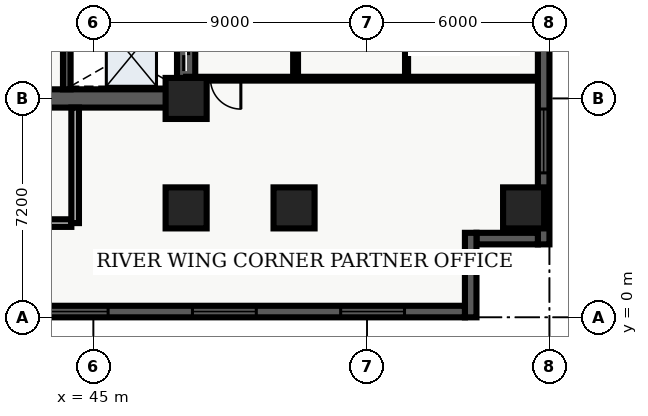
"""IFC4 building model, lengths in metres.
Left out: names, types, materials, properties, quantities, classifications, styles, units other than length and angle.
Written with IfcOpenShell. Run it as: python <this file> out.ifc"""

import sys

from ifc_helpers import new_model, entity, si_unit, converted_unit, direction, frame, origin_with_axes, origin_2d_with_axis, place, context, subcontext, project, spatial, polyline, rectangle, outline, extrude, element, fill, save


model = new_model("IFC4")
c1 = context("Model", 3, precision=1e-05, world=origin_with_axes(), true_north=direction((0.0, 1.0)))
c2 = subcontext(c1, "Body", "Model", "MODEL_VIEW")
j1 = project(units=[si_unit("LENGTHUNIT", "METRE"), converted_unit("PLANEANGLEUNIT", "DEGREE", entity("IfcPlaneAngleMeasure", 0.017), si_unit("PLANEANGLEUNIT", "RADIAN"), dimensions=[0, 0, 0, 0, 0, 0, 0])], contexts=[c1])
p1 = place(None, origin_with_axes())
s1 = spatial("IfcSite", under=j1, at=p1, CompositionType="ELEMENT")
p2 = place(p1, origin_with_axes())
s2 = spatial("IfcBuilding", under=s1, at=p2, CompositionType="ELEMENT")
p3 = place(p2, frame((0.0, 0.0, 71.7), z_axis=(0.0, 0.0, 1.0), x_axis=(1.0, 0.0, 0.0)))
s3 = spatial("IfcBuildingStorey", under=s2, at=p3, CompositionType="ELEMENT", Elevation=71.7)
p4 = place(p3, frame((40.2, 7.2, 0.0), z_axis=(0.0, 0.0, 1.0), x_axis=(1.0, 0.0, 0.0)))
e1 = element("IfcWall", 1, at=p4, inside=s3, PredefinedType="SHEAR", context=c2, shape_type="SweptSolid", body=[
    extrude(outline(polyline([(0.0, -0.3), (7.85, -0.3), (7.85, 0.3), (0.0, 0.3), (0.0, -0.3)])), origin_with_axes(), (0.0, 0.0, 1.0), 3.66),
])
p5 = place(p4, frame((2.175, 0.0, 0.0), z_axis=(0.0, 0.0, 1.0), x_axis=(1.0, 0.0, 0.0)))
e2 = element("IfcOpeningElement", 2, at=p5, cuts=e1, PredefinedType="OPENING", context=c2, shape_type="SweptSolid", body=[
    extrude(rectangle(XDim=1.05, YDim=0.62, at=origin_2d_with_axis()), origin_with_axes(), (0.0, 0.0, 1.0), 2.15),
])
p6 = place(p3, frame((48.05, 7.2, 0.0), z_axis=(0.0, 0.0, 1.0), x_axis=(0.0, 1.0, 0.0)))
e3 = element("IfcWall", 3, at=p6, inside=s3, PredefinedType="SHEAR", context=c2, shape_type="SweptSolid", body=[
    extrude(outline(polyline([(0.0, -0.3), (15.6, -0.3), (15.6, 0.3), (0.0, 0.3), (0.0, -0.3)])), origin_with_axes(), (0.0, 0.0, 1.0), 3.66),
])
p7 = place(p6, frame((1.425, 0.0, 0.0), z_axis=(0.0, 0.0, 1.0), x_axis=(1.0, 0.0, 0.0)))
e4 = element("IfcOpeningElement", 4, at=p7, cuts=e3, PredefinedType="OPENING", context=c2, shape_type="SweptSolid", body=[
    extrude(rectangle(XDim=1.05, YDim=0.62, at=origin_2d_with_axis()), origin_with_axes(), (0.0, 0.0, 1.0), 2.15),
])
p8 = place(p6, frame((3.475, 0.0, 0.0), z_axis=(0.0, 0.0, 1.0), x_axis=(1.0, 0.0, 0.0)))
e5 = element("IfcOpeningElement", 5, at=p8, cuts=e3, PredefinedType="OPENING", context=c2, shape_type="SweptSolid", body=[
    extrude(rectangle(XDim=1.05, YDim=0.62, at=origin_2d_with_axis()), origin_with_axes(), (0.0, 0.0, 1.0), 2.15),
])
p9 = place(p6, frame((5.625, 0.0, 0.0), z_axis=(0.0, 0.0, 1.0), x_axis=(1.0, 0.0, 0.0)))
e6 = element("IfcOpeningElement", 6, at=p9, cuts=e3, PredefinedType="OPENING", context=c2, shape_type="SweptSolid", body=[
    extrude(rectangle(XDim=0.95, YDim=0.62, at=origin_2d_with_axis()), origin_with_axes(), (0.0, 0.0, 1.0), 2.15),
])
p10 = place(p3, frame((44.125, 7.5, 0.0), z_axis=(0.0, 0.0, 1.0), x_axis=(0.0, 1.0, 0.0)))
e7 = element("IfcWall", 7, at=p10, inside=s3, PredefinedType="SHEAR", context=c2, shape_type="SweptSolid", body=[
    extrude(outline(polyline([(0.0, -0.125), (15.0, -0.125), (15.0, 0.125), (0.0, 0.125), (0.0, -0.125)])), origin_with_axes(), (0.0, 0.0, 1.0), 3.66),
])
p11 = place(p3, frame((40.325, 3.1, 0.0), z_axis=(0.0, 0.0, 1.0), x_axis=(1.0, 0.0, 0.0)))
e8 = element("IfcWall", 8, at=p11, inside=s3, PredefinedType="SOLIDWALL", context=c2, shape_type="SweptSolid", body=[
    extrude(outline(polyline([(0.0, -0.125), (3.95, -0.125), (3.95, 0.125), (0.0, 0.125), (0.0, -0.125)])), origin_with_axes(), (0.0, 0.0, 1.0), 2.7),
])
p12 = place(p3, frame((44.4, 3.1, 0.0), z_axis=(0.0, 0.0, 1.0), x_axis=(0.0, 1.0, 0.0)))
e9 = element("IfcWall", 9, at=p12, inside=s3, PredefinedType="SOLIDWALL", context=c2, shape_type="SweptSolid", body=[
    extrude(outline(polyline([(0.0, -0.125), (3.8, -0.125), (3.8, 0.125), (0.0, 0.125), (0.0, -0.125)])), origin_with_axes(), (0.0, 0.0, 1.0), 2.7),
])
for number, where, z_axis, x_axis in (
    (10, (48.05, 3.6, 0.0), (0.0, 0.0, 1.0), (1.0, 0.0, 0.0)),
    (11, (48.05, 7.2, 0.0), (0.0, 0.0, 1.0), (1.0, 0.0, 0.0)),
    (12, (51.6, 3.6, 0.0), (0.0, 0.0, 1.0), (1.0, 0.0, 0.0)),
    (13, (59.15, 3.6, 0.0), (0.0, 0.0, 1.0), (1.0, 0.0, 0.0)),
):
    element("IfcColumn", number, at=place(p3, frame(where, z_axis=z_axis, x_axis=x_axis)), inside=s3, PredefinedType="COLUMN", context=c2, shape_type="SweptSolid", body=[
        extrude(rectangle(XDim=1.35, YDim=1.35, at=origin_2d_with_axis()), origin_with_axes(), (0.0, 0.0, 1.0), 3.9),
    ])
p13 = place(p3, frame((51.65, 7.85, 0.0), z_axis=(0.0, 0.0, 1.0), x_axis=(0.0, 1.0, 0.0)))
e14 = element("IfcWall", 14, at=p13, inside=s3, PredefinedType="PARTITIONING", context=c2, shape_type="SweptSolid", body=[
    extrude(outline(polyline([(0.0, -0.08), (18.8, -0.08), (18.8, 0.08), (0.0, 0.08), (0.0, -0.08)])), origin_with_axes(), (0.0, 0.0, 1.0), 2.7),
])
p14 = place(p13, frame((4.473, 0.0, 0.0), z_axis=(0.0, 0.0, 1.0), x_axis=(1.0, 0.0, 0.0)))
e15 = element("IfcOpeningElement", 15, at=p14, cuts=e14, PredefinedType="OPENING", context=c2, shape_type="SweptSolid", body=[
    extrude(rectangle(XDim=1.0, YDim=0.18, at=origin_2d_with_axis()), origin_with_axes(), (0.0, 0.0, 1.0), 2.15),
])
p15 = place(p13, frame((13.533, 0.0, 0.0), z_axis=(0.0, 0.0, 1.0), x_axis=(1.0, 0.0, 0.0)))
e16 = element("IfcOpeningElement", 16, at=p15, cuts=e14, PredefinedType="OPENING", context=c2, shape_type="SweptSolid", body=[
    extrude(rectangle(XDim=1.0, YDim=0.18, at=origin_2d_with_axis()), origin_with_axes(), (0.0, 0.0, 1.0), 2.15),
])
p16 = place(p3, frame((59.64, 7.85, 0.0), z_axis=(0.0, 0.0, 1.0), x_axis=(-1.0, 0.0, 0.0)))
e17 = element("IfcWall", 17, at=p16, inside=s3, PredefinedType="PARTITIONING", context=c2, shape_type="SweptSolid", body=[
    extrude(outline(polyline([(0.0, -0.062), (11.59, -0.062), (11.59, 0.062), (0.0, 0.062), (0.0, -0.062)])), origin_with_axes(), (0.0, 0.0, 1.0), 2.7),
])
p17 = place(p16, frame((10.29, 0.0, 0.0), z_axis=(0.0, 0.0, 1.0), x_axis=(1.0, 0.0, 0.0)))
e18 = element("IfcOpeningElement", 18, at=p17, cuts=e17, PredefinedType="OPENING", context=c2, shape_type="SweptSolid", body=[
    extrude(rectangle(XDim=1.0, YDim=0.145, at=origin_2d_with_axis()), origin_with_axes(), (0.0, 0.0, 1.0), 2.15),
])
p18 = place(p3, frame((55.3, 7.98, 0.0), z_axis=(0.0, 0.0, 1.0), x_axis=(0.0, 1.0, 0.0)))
e19 = element("IfcWall", 19, at=p18, inside=s3, PredefinedType="PARTITIONING", context=c2, shape_type="SweptSolid", body=[
    extrude(outline(polyline([(0.0, -0.05), (18.54, -0.05), (18.54, 0.05), (0.0, 0.05), (0.0, -0.05)])), origin_with_axes(), (0.0, 0.0, 1.0), 2.7),
])
p19 = place(p18, frame((4.062, 0.0, 0.0), z_axis=(0.0, 0.0, 1.0), x_axis=(1.0, 0.0, 0.0)))
e20 = element("IfcOpeningElement", 20, at=p19, cuts=e19, PredefinedType="OPENING", context=c2, shape_type="SweptSolid", body=[
    extrude(rectangle(XDim=0.95, YDim=0.12, at=origin_2d_with_axis()), origin_with_axes(), (0.0, 0.0, 1.0), 2.15),
])
p20 = place(p18, frame((13.402, 0.0, 0.0), z_axis=(0.0, 0.0, 1.0), x_axis=(1.0, 0.0, 0.0)))
e21 = element("IfcOpeningElement", 21, at=p20, cuts=e19, PredefinedType="OPENING", context=c2, shape_type="SweptSolid", body=[
    extrude(rectangle(XDim=0.95, YDim=0.12, at=origin_2d_with_axis()), origin_with_axes(), (0.0, 0.0, 1.0), 2.15),
])
p21 = place(p3, frame((59.81, 26.02, 0.0), z_axis=(0.0, 0.0, 1.0), x_axis=(0.0, -1.0, 0.0)))
e22 = element("IfcWall", 22, at=p21, inside=s3, PredefinedType="SOLIDWALL", context=c2, shape_type="SweptSolid", body=[
    extrude(outline(polyline([(0.0, -0.19), (23.62, -0.19), (23.62, 0.19), (0.0, 0.19), (0.0, -0.19)])), origin_with_axes(), (0.0, 0.0, 1.0), 3.66),
])
p22 = place(p21, frame((3.853, 0.0, 0.45), z_axis=(0.0, 0.0, 1.0), x_axis=(1.0, 0.0, 0.0)))
e23 = element("IfcOpeningElement", 23, at=p22, cuts=e22, PredefinedType="OPENING", context=c2, shape_type="SweptSolid", body=[
    extrude(rectangle(XDim=2.1, YDim=0.4, at=origin_2d_with_axis()), origin_with_axes(), (0.0, 0.0, 1.0), 2.2),
])
p23 = place(p21, frame((20.218, 0.0, 0.45), z_axis=(0.0, 0.0, 1.0), x_axis=(1.0, 0.0, 0.0)))
e24 = element("IfcOpeningElement", 24, at=p23, cuts=e22, PredefinedType="OPENING", context=c2, shape_type="SweptSolid", body=[
    extrude(rectangle(XDim=2.1, YDim=0.4, at=origin_2d_with_axis()), origin_with_axes(), (0.0, 0.0, 1.0), 2.2),
])
p24 = place(p3, frame((59.62, 2.59, 0.0), z_axis=(0.0, 0.0, 1.0), x_axis=(-1.0, 0.0, 0.0)))
e25 = element("IfcWall", 25, at=p24, inside=s3, PredefinedType="SOLIDWALL", context=c2, shape_type="SweptSolid", body=[
    extrude(outline(polyline([(0.0, -0.19), (2.02, -0.19), (2.02, 0.19), (0.0, 0.19), (0.0, -0.19)])), origin_with_axes(), (0.0, 0.0, 1.0), 3.66),
])
p25 = place(p3, frame((57.41, 2.78, 0.0), z_axis=(0.0, 0.0, 1.0), x_axis=(0.0, -1.0, 0.0)))
e26 = element("IfcWall", 26, at=p25, inside=s3, PredefinedType="SOLIDWALL", context=c2, shape_type="SweptSolid", body=[
    extrude(outline(polyline([(0.0, -0.19), (2.78, -0.19), (2.78, 0.19), (0.0, 0.19), (0.0, -0.19)])), origin_with_axes(), (0.0, 0.0, 1.0), 3.66),
])
p26 = place(p3, frame((57.22, 0.19, 0.0), z_axis=(0.0, 0.0, 1.0), x_axis=(-1.0, 0.0, 0.0)))
e27 = element("IfcWall", 27, at=p26, inside=s3, PredefinedType="SOLIDWALL", context=c2, shape_type="SweptSolid", body=[
    extrude(outline(polyline([(0.0, -0.19), (54.82, -0.19), (54.82, 0.19), (0.0, 0.19), (0.0, -0.19)])), origin_with_axes(), (0.0, 0.0, 1.0), 3.66),
])
p27 = place(p26, frame((3.037, 0.0, 0.45), z_axis=(0.0, 0.0, 1.0), x_axis=(1.0, 0.0, 0.0)))
e28 = element("IfcOpeningElement", 28, at=p27, cuts=e27, PredefinedType="OPENING", context=c2, shape_type="SweptSolid", body=[
    extrude(rectangle(XDim=2.1, YDim=0.4, at=origin_2d_with_axis()), origin_with_axes(), (0.0, 0.0, 1.0), 2.2),
])
p28 = place(p26, frame((7.912, 0.0, 0.45), z_axis=(0.0, 0.0, 1.0), x_axis=(1.0, 0.0, 0.0)))
e29 = element("IfcOpeningElement", 29, at=p28, cuts=e27, PredefinedType="OPENING", context=c2, shape_type="SweptSolid", body=[
    extrude(rectangle(XDim=2.1, YDim=0.4, at=origin_2d_with_axis()), origin_with_axes(), (0.0, 0.0, 1.0), 2.2),
])
p29 = place(p26, frame((12.786, 0.0, 0.45), z_axis=(0.0, 0.0, 1.0), x_axis=(1.0, 0.0, 0.0)))
e30 = element("IfcOpeningElement", 30, at=p29, cuts=e27, PredefinedType="OPENING", context=c2, shape_type="SweptSolid", body=[
    extrude(rectangle(XDim=2.1, YDim=0.4, at=origin_2d_with_axis()), origin_with_axes(), (0.0, 0.0, 1.0), 2.2),
])
p30 = place(p26, frame((17.661, 0.0, 0.45), z_axis=(0.0, 0.0, 1.0), x_axis=(1.0, 0.0, 0.0)))
e31 = element("IfcOpeningElement", 31, at=p30, cuts=e27, PredefinedType="OPENING", context=c2, shape_type="SweptSolid", body=[
    extrude(rectangle(XDim=2.1, YDim=0.4, at=origin_2d_with_axis()), origin_with_axes(), (0.0, 0.0, 1.0), 2.2),
])
p31 = place(p26, frame((22.535, 0.0, 0.45), z_axis=(0.0, 0.0, 1.0), x_axis=(1.0, 0.0, 0.0)))
e32 = element("IfcOpeningElement", 32, at=p31, cuts=e27, PredefinedType="OPENING", context=c2, shape_type="SweptSolid", body=[
    extrude(rectangle(XDim=2.1, YDim=0.4, at=origin_2d_with_axis()), origin_with_axes(), (0.0, 0.0, 1.0), 2.2),
])
p32 = place(p26, frame((27.41, 0.0, 0.45), z_axis=(0.0, 0.0, 1.0), x_axis=(1.0, 0.0, 0.0)))
e33 = element("IfcOpeningElement", 33, at=p32, cuts=e27, PredefinedType="OPENING", context=c2, shape_type="SweptSolid", body=[
    extrude(rectangle(XDim=2.1, YDim=0.4, at=origin_2d_with_axis()), origin_with_axes(), (0.0, 0.0, 1.0), 2.2),
])
p33 = place(p26, frame((32.285, 0.0, 0.45), z_axis=(0.0, 0.0, 1.0), x_axis=(1.0, 0.0, 0.0)))
e34 = element("IfcOpeningElement", 34, at=p33, cuts=e27, PredefinedType="OPENING", context=c2, shape_type="SweptSolid", body=[
    extrude(rectangle(XDim=2.1, YDim=0.4, at=origin_2d_with_axis()), origin_with_axes(), (0.0, 0.0, 1.0), 2.2),
])
p34 = place(p26, frame((37.159, 0.0, 0.45), z_axis=(0.0, 0.0, 1.0), x_axis=(1.0, 0.0, 0.0)))
e35 = element("IfcOpeningElement", 35, at=p34, cuts=e27, PredefinedType="OPENING", context=c2, shape_type="SweptSolid", body=[
    extrude(rectangle(XDim=2.1, YDim=0.4, at=origin_2d_with_axis()), origin_with_axes(), (0.0, 0.0, 1.0), 2.2),
])
p35 = place(p26, frame((47.758, 0.0, 0.45), z_axis=(0.0, 0.0, 1.0), x_axis=(1.0, 0.0, 0.0)))
e36 = element("IfcOpeningElement", 36, at=p35, cuts=e27, PredefinedType="OPENING", context=c2, shape_type="SweptSolid", body=[
    extrude(rectangle(XDim=2.1, YDim=0.4, at=origin_2d_with_axis()), origin_with_axes(), (0.0, 0.0, 1.0), 2.2),
])
p36 = place(p26, frame((52.633, 0.0, 0.45), z_axis=(0.0, 0.0, 1.0), x_axis=(1.0, 0.0, 0.0)))
e37 = element("IfcOpeningElement", 37, at=p36, cuts=e27, PredefinedType="OPENING", context=c2, shape_type="SweptSolid", body=[
    extrude(rectangle(XDim=2.1, YDim=0.4, at=origin_2d_with_axis()), origin_with_axes(), (0.0, 0.0, 1.0), 2.2),
])
p37 = place(p6, frame((1.425, 0.0, 0.0), z_axis=(0.0, 0.0, 1.0), x_axis=(1.0, 0.0, 0.0)))
e38 = element("IfcDoor", 38, at=p37, inside=s3, OperationType="SLIDING_TO_LEFT", PredefinedType="DOOR", context=c2, shape_type="SweptSolid", body=[
    extrude(rectangle(XDim=1.05, YDim=0.09, at=origin_2d_with_axis()), origin_with_axes(), (0.0, 0.0, 1.0), 2.15),
])
fill(e4, e38)
p38 = place(p16, frame((10.29, 0.0, 0.0), z_axis=(0.0, 0.0, 1.0), x_axis=(1.0, 0.0, 0.0)))
e39 = element("IfcDoor", 39, at=p38, inside=s3, OperationType="SINGLE_SWING_LEFT", PredefinedType="DOOR", context=c2, shape_type="SweptSolid", body=[
    extrude(rectangle(XDim=1.0, YDim=0.075, at=origin_2d_with_axis()), origin_with_axes(), (0.0, 0.0, 1.0), 2.15),
])
fill(e18, e39)
p39 = place(p21, frame((20.218, 0.0, 0.45), z_axis=(0.0, 0.0, 1.0), x_axis=(1.0, 0.0, 0.0)))
e40 = element("IfcWindow", 40, at=p39, inside=s3, PredefinedType="WINDOW", context=c2, shape_type="SweptSolid", body=[
    extrude(rectangle(XDim=2.1, YDim=0.09, at=origin_2d_with_axis()), origin_with_axes(), (0.0, 0.0, 1.0), 2.2),
])
fill(e24, e40)
p40 = place(p26, frame((3.037, 0.0, 0.45), z_axis=(0.0, 0.0, 1.0), x_axis=(1.0, 0.0, 0.0)))
e41 = element("IfcWindow", 41, at=p40, inside=s3, PredefinedType="WINDOW", context=c2, shape_type="SweptSolid", body=[
    extrude(rectangle(XDim=2.1, YDim=0.09, at=origin_2d_with_axis()), origin_with_axes(), (0.0, 0.0, 1.0), 2.2),
])
fill(e28, e41)
p41 = place(p26, frame((7.912, 0.0, 0.45), z_axis=(0.0, 0.0, 1.0), x_axis=(1.0, 0.0, 0.0)))
e42 = element("IfcWindow", 42, at=p41, inside=s3, PredefinedType="WINDOW", context=c2, shape_type="SweptSolid", body=[
    extrude(rectangle(XDim=2.1, YDim=0.09, at=origin_2d_with_axis()), origin_with_axes(), (0.0, 0.0, 1.0), 2.2),
])
fill(e29, e42)
p42 = place(p26, frame((12.786, 0.0, 0.45), z_axis=(0.0, 0.0, 1.0), x_axis=(1.0, 0.0, 0.0)))
e43 = element("IfcWindow", 43, at=p42, inside=s3, PredefinedType="WINDOW", context=c2, shape_type="SweptSolid", body=[
    extrude(rectangle(XDim=2.1, YDim=0.09, at=origin_2d_with_axis()), origin_with_axes(), (0.0, 0.0, 1.0), 2.2),
])
fill(e30, e43)
save(model, sys.argv[1])
